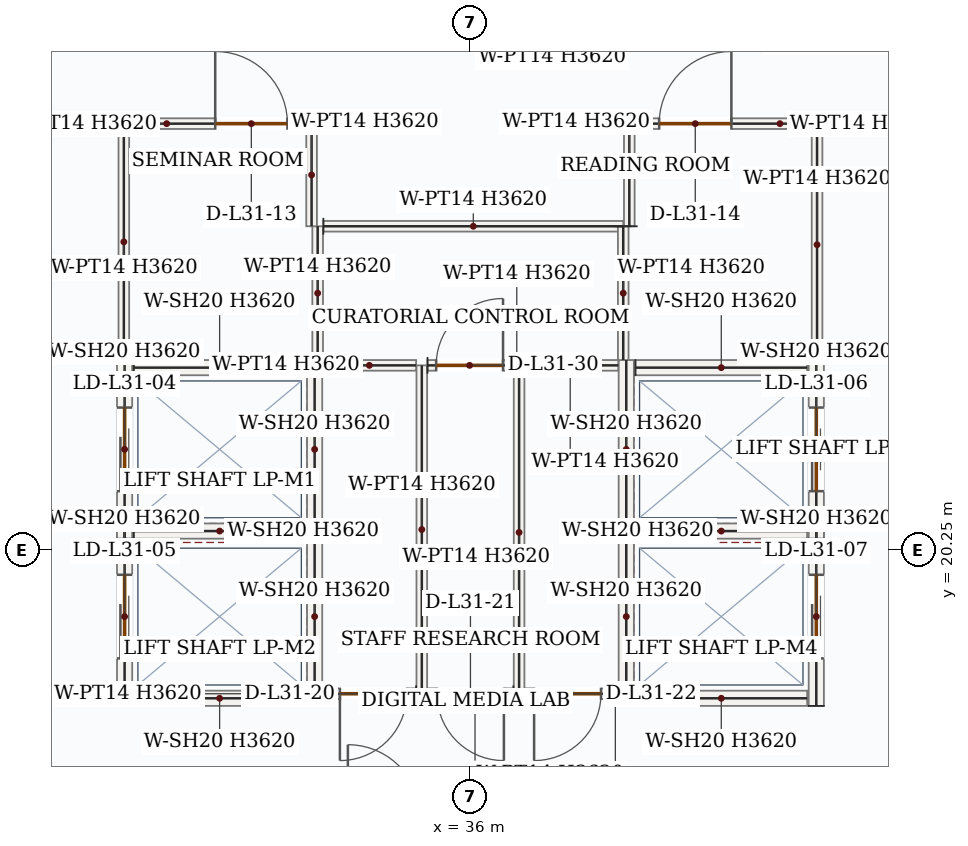
"""IFC4 building model, lengths in metres.
Left out: names, types, materials, properties, quantities, classifications, styles, units other than length and angle.
Written with IfcOpenShell. Run it as: python <this file> out.ifc"""

import sys

from ifc_helpers import new_model, si_unit, direction, frame, frame_2d, origin, place, context, subcontext, project, spatial, rectangle, extrude, source, transform, mapped, element, fill, save


model = new_model("IFC4")
c1 = context("Model", 3, precision=1e-05, world=origin(), true_north=direction((0.0, 1.0)))
c2 = subcontext(c1, "Body", "Model", "MODEL_VIEW")
j1 = project(units=[si_unit("LENGTHUNIT", "METRE"), si_unit("PLANEANGLEUNIT", "RADIAN")], contexts=[c1])
p1 = place(None, origin())
s1 = spatial("IfcSite", under=j1, at=p1, CompositionType="ELEMENT")
p2 = place(p1, origin())
s2 = spatial("IfcBuilding", under=s1, at=p2, CompositionType="ELEMENT")
p3 = place(p2, frame((0.0, 0.0, 139.5)))
s3 = spatial("IfcBuildingStorey", under=s2, at=p3, CompositionType="ELEMENT", Elevation=139.5)
p4 = place(p3, frame((31.45, 20.4, 0.0), z_axis=(0.0, 0.0, 1.0), x_axis=(0.0, 1.0, 0.0)))
e1 = element("IfcWall", 1, at=p4, inside=s3, PredefinedType="SOLIDWALL", context=c2, shape_type="SweptSolid", body=[
    extrude(rectangle(XDim=2.35, YDim=0.2, at=frame_2d((1.175, 0.0))), origin(), (0.0, 0.0, 1.0), 3.62),
])
p5 = place(p4, frame((0.625, 0.0, 0.0)))
e2 = element("IfcOpeningElement", 2, at=p5, cuts=e1, PredefinedType="OPENING", context=c2, shape_type="SweptSolid", body=[
    extrude(rectangle(XDim=1.1, YDim=2.15, at=frame_2d((0.55, 1.075))), frame((0.0, 0.11, 0.0), z_axis=(0.0, -1.0, 0.0), x_axis=(1.0, 0.0, 0.0)), (0.0, 0.0, 1.0), 0.22),
])
m1 = source(origin(), c2, "Body", "SweptSolid", [
    extrude(rectangle(XDim=2.35, YDim=0.2, at=frame_2d((1.175, 0.0))), origin(), (0.0, 0.0, 1.0), 3.62),
])
p6 = place(p3, frame((33.95, 20.4, 0.0), z_axis=(0.0, 0.0, 1.0), x_axis=(0.0, 1.0, 0.0)))
e3 = element("IfcWall", 3, at=p6, inside=s3, PredefinedType="SOLIDWALL", context=c2, shape_type="MappedRepresentation", body=[
    mapped(m1, transform((0.0, 0.0, 0.0), x_axis=(1.0, 0.0, 0.0), y_axis=(0.0, 1.0, 0.0), z_axis=(0.0, 0.0, 1.0), scale=1.0)),
])
m2 = source(origin(), c2, "Body", "SweptSolid", [
    extrude(rectangle(XDim=2.26, YDim=0.2, at=frame_2d((1.13, 0.0))), origin(), (0.0, 0.0, 1.0), 3.62),
])
for number, where, z_axis, x_axis in (
    (4, (31.57, 20.5, 0.0), (0.0, 0.0, 1.0), (1.0, 0.0, 0.0)),
    (5, (31.57, 22.65, 0.0), (0.0, 0.0, 1.0), (1.0, 0.0, 0.0)),
):
    element("IfcWall", number, at=place(p3, frame(where, z_axis=z_axis, x_axis=x_axis)), inside=s3, PredefinedType="SOLIDWALL", context=c2, shape_type="MappedRepresentation", body=[
        mapped(m2, transform((0.0, 0.0, 0.0), x_axis=(1.0, 0.0, 0.0), y_axis=(0.0, 1.0, 0.0), z_axis=(0.0, 0.0, 1.0), scale=1.0)),
    ])
p7 = place(p3, frame((31.45, 18.2, 0.0), z_axis=(0.0, 0.0, 1.0), x_axis=(0.0, 1.0, 0.0)))
e6 = element("IfcWall", 6, at=p7, inside=s3, PredefinedType="SOLIDWALL", context=c2, shape_type="SweptSolid", body=[
    extrude(rectangle(XDim=2.35, YDim=0.2, at=frame_2d((1.175, 0.0))), origin(), (0.0, 0.0, 1.0), 3.62),
])
p8 = place(p7, frame((0.625, 0.0, 0.0)))
e7 = element("IfcOpeningElement", 7, at=p8, cuts=e6, PredefinedType="OPENING", context=c2, shape_type="SweptSolid", body=[
    extrude(rectangle(XDim=1.1, YDim=2.15, at=frame_2d((0.55, 1.075))), frame((0.0, 0.11, 0.0), z_axis=(0.0, -1.0, 0.0), x_axis=(1.0, 0.0, 0.0)), (0.0, 0.0, 1.0), 0.22),
])
p9 = place(p3, frame((33.95, 18.2, 0.0), z_axis=(0.0, 0.0, 1.0), x_axis=(0.0, 1.0, 0.0)))
e8 = element("IfcWall", 8, at=p9, inside=s3, PredefinedType="SOLIDWALL", context=c2, shape_type="MappedRepresentation", body=[
    mapped(m1, transform((0.0, 0.0, 0.0), x_axis=(1.0, 0.0, 0.0), y_axis=(0.0, 1.0, 0.0), z_axis=(0.0, 0.0, 1.0), scale=1.0)),
])
p10 = place(p3, frame((31.57, 18.3, 0.0), z_axis=(0.0, 0.0, 1.0), x_axis=(1.0, 0.0, 0.0)))
e9 = element("IfcWall", 9, at=p10, inside=s3, PredefinedType="SOLIDWALL", context=c2, shape_type="MappedRepresentation", body=[
    mapped(m2, transform((0.0, 0.0, 0.0), x_axis=(1.0, 0.0, 0.0), y_axis=(0.0, 1.0, 0.0), z_axis=(0.0, 0.0, 1.0), scale=1.0)),
])
p11 = place(p3, frame((38.05, 20.4, 0.0), z_axis=(0.0, 0.0, 1.0), x_axis=(0.0, 1.0, 0.0)))
e10 = element("IfcWall", 10, at=p11, inside=s3, PredefinedType="SOLIDWALL", context=c2, shape_type="MappedRepresentation", body=[
    mapped(m1, transform((0.0, 0.0, 0.0), x_axis=(1.0, 0.0, 0.0), y_axis=(0.0, 1.0, 0.0), z_axis=(0.0, 0.0, 1.0), scale=1.0)),
])
p12 = place(p3, frame((40.55, 20.4, 0.0), z_axis=(0.0, 0.0, 1.0), x_axis=(0.0, 1.0, 0.0)))
e11 = element("IfcWall", 11, at=p12, inside=s3, PredefinedType="SOLIDWALL", context=c2, shape_type="SweptSolid", body=[
    extrude(rectangle(XDim=2.35, YDim=0.2, at=frame_2d((1.175, 0.0))), origin(), (0.0, 0.0, 1.0), 3.62),
])
p13 = place(p12, frame((0.625, 0.0, 0.0)))
e12 = element("IfcOpeningElement", 12, at=p13, cuts=e11, PredefinedType="OPENING", context=c2, shape_type="SweptSolid", body=[
    extrude(rectangle(XDim=1.1, YDim=2.15, at=frame_2d((0.55, 1.075))), frame((0.0, 0.11, 0.0), z_axis=(0.0, -1.0, 0.0), x_axis=(1.0, 0.0, 0.0)), (0.0, 0.0, 1.0), 0.22),
])
for number, where, z_axis, x_axis in (
    (13, (38.17, 20.5, 0.0), (0.0, 0.0, 1.0), (1.0, 0.0, 0.0)),
    (14, (38.17, 22.65, 0.0), (0.0, 0.0, 1.0), (1.0, 0.0, 0.0)),
):
    element("IfcWall", number, at=place(p3, frame(where, z_axis=z_axis, x_axis=x_axis)), inside=s3, PredefinedType="SOLIDWALL", context=c2, shape_type="MappedRepresentation", body=[
        mapped(m2, transform((0.0, 0.0, 0.0), x_axis=(1.0, 0.0, 0.0), y_axis=(0.0, 1.0, 0.0), z_axis=(0.0, 0.0, 1.0), scale=1.0)),
    ])
p14 = place(p3, frame((38.05, 18.2, 0.0), z_axis=(0.0, 0.0, 1.0), x_axis=(0.0, 1.0, 0.0)))
e15 = element("IfcWall", 15, at=p14, inside=s3, PredefinedType="SOLIDWALL", context=c2, shape_type="MappedRepresentation", body=[
    mapped(m1, transform((0.0, 0.0, 0.0), x_axis=(1.0, 0.0, 0.0), y_axis=(0.0, 1.0, 0.0), z_axis=(0.0, 0.0, 1.0), scale=1.0)),
])
p15 = place(p3, frame((40.55, 18.2, 0.0), z_axis=(0.0, 0.0, 1.0), x_axis=(0.0, 1.0, 0.0)))
e16 = element("IfcWall", 16, at=p15, inside=s3, PredefinedType="SOLIDWALL", context=c2, shape_type="SweptSolid", body=[
    extrude(rectangle(XDim=2.35, YDim=0.2, at=frame_2d((1.175, 0.0))), origin(), (0.0, 0.0, 1.0), 3.62),
])
p16 = place(p15, frame((0.625, 0.0, 0.0)))
e17 = element("IfcOpeningElement", 17, at=p16, cuts=e16, PredefinedType="OPENING", context=c2, shape_type="SweptSolid", body=[
    extrude(rectangle(XDim=1.1, YDim=2.15, at=frame_2d((0.55, 1.075))), frame((0.0, 0.11, 0.0), z_axis=(0.0, -1.0, 0.0), x_axis=(1.0, 0.0, 0.0)), (0.0, 0.0, 1.0), 0.22),
])
p17 = place(p3, frame((38.17, 18.3, 0.0), z_axis=(0.0, 0.0, 1.0), x_axis=(1.0, 0.0, 0.0)))
e18 = element("IfcWall", 18, at=p17, inside=s3, PredefinedType="SOLIDWALL", context=c2, shape_type="MappedRepresentation", body=[
    mapped(m2, transform((0.0, 0.0, 0.0), x_axis=(1.0, 0.0, 0.0), y_axis=(0.0, 1.0, 0.0), z_axis=(0.0, 0.0, 1.0), scale=1.0)),
])
m3 = source(origin(), c2, "Body", "SweptSolid", [
    extrude(rectangle(XDim=4.32, YDim=0.14, at=frame_2d((2.16, 0.0))), origin(), (0.0, 0.0, 1.0), 3.62),
])
p18 = place(p3, frame((35.36, 18.36, 0.0), z_axis=(0.0, 0.0, 1.0), x_axis=(0.0, 1.0, 0.0)))
e19 = element("IfcWall", 19, at=p18, inside=s3, PredefinedType="PARTITIONING", context=c2, shape_type="MappedRepresentation", body=[
    mapped(m3, transform((0.0, 0.0, 0.0), x_axis=(1.0, 0.0, 0.0), y_axis=(0.0, 1.0, 0.0), z_axis=(0.0, 0.0, 1.0), scale=1.0)),
])
p19 = place(p3, frame((35.435, 22.68, 0.0), z_axis=(0.0, 0.0, 1.0), x_axis=(1.0, 0.0, 0.0)))
e20 = element("IfcWall", 20, at=p19, inside=s3, PredefinedType="PARTITIONING", context=c2, shape_type="SweptSolid", body=[
    extrude(rectangle(XDim=1.205, YDim=0.14, at=frame_2d((0.603, 0.0))), origin(), (0.0, 0.0, 1.0), 3.62),
])
p20 = place(p19, frame((0.114, 0.0, 0.0)))
e21 = element("IfcOpeningElement", 21, at=p20, cuts=e20, PredefinedType="OPENING", context=c2, shape_type="SweptSolid", body=[
    extrude(rectangle(XDim=0.88, YDim=2.1, at=frame_2d((0.44, 1.05))), frame((0.0, 0.08, 0.0), z_axis=(0.0, -1.0, 0.0), x_axis=(1.0, 0.0, 0.0)), (0.0, 0.0, 1.0), 0.16),
])
m4 = source(origin(), c2, "Body", "SweptSolid", [
    extrude(rectangle(XDim=4.245, YDim=0.14, at=frame_2d((2.123, 0.0))), origin(), (0.0, 0.0, 1.0), 3.62),
])
p21 = place(p3, frame((36.64, 22.605, 0.0), z_axis=(0.0, 0.0, 1.0), x_axis=(0.0, -1.0, 0.0)))
e22 = element("IfcWall", 22, at=p21, inside=s3, PredefinedType="PARTITIONING", context=c2, shape_type="MappedRepresentation", body=[
    mapped(m4, transform((0.0, 0.0, 0.0), x_axis=(1.0, 0.0, 0.0), y_axis=(0.0, 1.0, 0.0), z_axis=(0.0, 0.0, 1.0), scale=1.0)),
])
p22 = place(p3, frame((36.565, 18.36, 0.0), z_axis=(0.0, 0.0, 1.0), x_axis=(-1.0, 0.0, 0.0)))
e23 = element("IfcWall", 23, at=p22, inside=s3, PredefinedType="PARTITIONING", context=c2, shape_type="SweptSolid", body=[
    extrude(rectangle(XDim=1.13, YDim=0.14, at=frame_2d((0.565, 0.0))), origin(), (0.0, 0.0, 1.0), 3.62),
])
p23 = place(p22, frame((0.125, 0.0, 0.0)))
e24 = element("IfcOpeningElement", 24, at=p23, cuts=e23, PredefinedType="OPENING", context=c2, shape_type="SweptSolid", body=[
    extrude(rectangle(XDim=0.88, YDim=2.1, at=frame_2d((0.44, 1.05))), frame((0.0, 0.08, 0.0), z_axis=(0.0, -1.0, 0.0), x_axis=(1.0, 0.0, 0.0)), (0.0, 0.0, 1.0), 0.16),
])
m5 = source(origin(), c2, "Body", "SweptSolid", [
    extrude(rectangle(XDim=1.23, YDim=0.14, at=frame_2d((0.615, 0.0))), origin(), (0.0, 0.0, 1.0), 3.62),
])
p24 = place(p3, frame((34.055, 22.68, 0.0), z_axis=(0.0, 0.0, 1.0), x_axis=(1.0, 0.0, 0.0)))
e25 = element("IfcWall", 25, at=p24, inside=s3, PredefinedType="PARTITIONING", context=c2, shape_type="MappedRepresentation", body=[
    mapped(m5, transform((0.0, 0.0, 0.0), x_axis=(1.0, 0.0, 0.0), y_axis=(0.0, 1.0, 0.0), z_axis=(0.0, 0.0, 1.0), scale=1.0)),
])
p25 = place(p3, frame((35.285, 18.36, 0.0), z_axis=(0.0, 0.0, 1.0), x_axis=(-1.0, 0.0, 0.0)))
e26 = element("IfcWall", 26, at=p25, inside=s3, PredefinedType="PARTITIONING", context=c2, shape_type="SweptSolid", body=[
    extrude(rectangle(XDim=1.23, YDim=0.14, at=frame_2d((0.615, 0.0))), origin(), (0.0, 0.0, 1.0), 3.62),
])
p26 = place(p25, frame((0.123, 0.0, 0.0)))
e27 = element("IfcOpeningElement", 27, at=p26, cuts=e26, PredefinedType="OPENING", context=c2, shape_type="SweptSolid", body=[
    extrude(rectangle(XDim=0.88, YDim=2.1, at=frame_2d((0.44, 1.05))), frame((0.0, 0.08, 0.0), z_axis=(0.0, -1.0, 0.0), x_axis=(1.0, 0.0, 0.0)), (0.0, 0.0, 1.0), 0.16),
])
m6 = source(origin(), c2, "Body", "SweptSolid", [
    extrude(rectangle(XDim=1.265, YDim=0.14, at=frame_2d((0.633, 0.0))), origin(), (0.0, 0.0, 1.0), 3.62),
])
p27 = place(p3, frame((36.68, 22.68, 0.0), z_axis=(0.0, 0.0, 1.0), x_axis=(1.0, 0.0, 0.0)))
e28 = element("IfcWall", 28, at=p27, inside=s3, PredefinedType="PARTITIONING", context=c2, shape_type="MappedRepresentation", body=[
    mapped(m6, transform((0.0, 0.0, 0.0), x_axis=(1.0, 0.0, 0.0), y_axis=(0.0, 1.0, 0.0), z_axis=(0.0, 0.0, 1.0), scale=1.0)),
])
p28 = place(p3, frame((37.945, 18.36, 0.0), z_axis=(0.0, 0.0, 1.0), x_axis=(-1.0, 0.0, 0.0)))
e29 = element("IfcWall", 29, at=p28, inside=s3, PredefinedType="PARTITIONING", context=c2, shape_type="SweptSolid", body=[
    extrude(rectangle(XDim=1.23, YDim=0.14, at=frame_2d((0.615, 0.0))), origin(), (0.0, 0.0, 1.0), 3.62),
])
p29 = place(p28, frame((0.228, 0.0, 0.0)))
e30 = element("IfcOpeningElement", 30, at=p29, cuts=e29, PredefinedType="OPENING", context=c2, shape_type="SweptSolid", body=[
    extrude(rectangle(XDim=0.88, YDim=2.1, at=frame_2d((0.44, 1.05))), frame((0.0, 0.08, 0.0), z_axis=(0.0, -1.0, 0.0), x_axis=(1.0, 0.0, 0.0)), (0.0, 0.0, 1.0), 0.16),
])
m7 = source(origin(), c2, "Body", "SweptSolid", [
    extrude(rectangle(XDim=1.76, YDim=0.14, at=frame_2d((0.88, 0.0))), origin(), (0.0, 0.0, 1.0), 3.62),
])
p30 = place(p3, frame((33.99, 22.75, 0.0), z_axis=(0.0, 0.0, 1.0), x_axis=(0.0, 1.0, 0.0)))
e31 = element("IfcWall", 31, at=p30, inside=s3, PredefinedType="PARTITIONING", context=c2, shape_type="MappedRepresentation", body=[
    mapped(m7, transform((0.0, 0.0, 0.0), x_axis=(1.0, 0.0, 0.0), y_axis=(0.0, 1.0, 0.0), z_axis=(0.0, 0.0, 1.0), scale=1.0)),
])
m8 = source(origin(), c2, "Body", "SweptSolid", [
    extrude(rectangle(XDim=3.945, YDim=0.14, at=frame_2d((1.973, 0.0))), origin(), (0.0, 0.0, 1.0), 3.62),
])
p31 = place(p3, frame((34.065, 24.51, 0.0), z_axis=(0.0, 0.0, 1.0), x_axis=(1.0, 0.0, 0.0)))
e32 = element("IfcWall", 32, at=p31, inside=s3, PredefinedType="PARTITIONING", context=c2, shape_type="MappedRepresentation", body=[
    mapped(m8, transform((0.0, 0.0, 0.0), x_axis=(1.0, 0.0, 0.0), y_axis=(0.0, 1.0, 0.0), z_axis=(0.0, 0.0, 1.0), scale=1.0)),
])
p32 = place(p3, frame((38.01, 24.51, 0.0), z_axis=(0.0, 0.0, 1.0), x_axis=(0.0, -1.0, 0.0)))
e33 = element("IfcWall", 33, at=p32, inside=s3, PredefinedType="PARTITIONING", context=c2, shape_type="MappedRepresentation", body=[
    mapped(m7, transform((0.0, 0.0, 0.0), x_axis=(1.0, 0.0, 0.0), y_axis=(0.0, 1.0, 0.0), z_axis=(0.0, 0.0, 1.0), scale=1.0)),
])
m9 = source(origin(), c2, "Body", "SweptSolid", [
    extrude(rectangle(XDim=3.11, YDim=0.14, at=frame_2d((1.555, 0.0))), origin(), (0.0, 0.0, 1.0), 3.62),
])
p33 = place(p3, frame((31.44, 22.75, 0.0), z_axis=(0.0, 0.0, 1.0), x_axis=(0.0, 1.0, 0.0)))
e34 = element("IfcWall", 34, at=p33, inside=s3, PredefinedType="PARTITIONING", context=c2, shape_type="MappedRepresentation", body=[
    mapped(m9, transform((0.0, 0.0, 0.0), x_axis=(1.0, 0.0, 0.0), y_axis=(0.0, 1.0, 0.0), z_axis=(0.0, 0.0, 1.0), scale=1.0)),
])
p34 = place(p3, frame((31.515, 25.86, 0.0), z_axis=(0.0, 0.0, 1.0), x_axis=(1.0, 0.0, 0.0)))
e35 = element("IfcWall", 35, at=p34, inside=s3, PredefinedType="PARTITIONING", context=c2, shape_type="SweptSolid", body=[
    extrude(rectangle(XDim=2.395, YDim=0.14, at=frame_2d((1.198, 0.0))), origin(), (0.0, 0.0, 1.0), 3.62),
])
p35 = place(p34, frame((1.127, 0.0, 0.0)))
e36 = element("IfcOpeningElement", 36, at=p35, cuts=e35, PredefinedType="OPENING", context=c2, shape_type="SweptSolid", body=[
    extrude(rectangle(XDim=0.95, YDim=2.15, at=frame_2d((0.475, 1.075))), frame((0.0, 0.08, 0.0), z_axis=(0.0, -1.0, 0.0), x_axis=(1.0, 0.0, 0.0)), (0.0, 0.0, 1.0), 0.16),
])
m10 = source(origin(), c2, "Body", "SweptSolid", [
    extrude(rectangle(XDim=1.35, YDim=0.14, at=frame_2d((0.675, 0.0))), origin(), (0.0, 0.0, 1.0), 3.62),
])
for number, where, z_axis, x_axis in (
    (37, (33.91, 25.86, 0.0), (0.0, 0.0, 1.0), (0.0, -1.0, 0.0)),
    (38, (38.09, 24.51, 0.0), (0.0, 0.0, 1.0), (0.0, 1.0, 0.0)),
):
    element("IfcWall", number, at=place(p3, frame(where, z_axis=z_axis, x_axis=x_axis)), inside=s3, PredefinedType="PARTITIONING", context=c2, shape_type="MappedRepresentation", body=[
        mapped(m10, transform((0.0, 0.0, 0.0), x_axis=(1.0, 0.0, 0.0), y_axis=(0.0, 1.0, 0.0), z_axis=(0.0, 0.0, 1.0), scale=1.0)),
    ])
p36 = place(p3, frame((38.165, 25.86, 0.0), z_axis=(0.0, 0.0, 1.0), x_axis=(1.0, 0.0, 0.0)))
e39 = element("IfcWall", 39, at=p36, inside=s3, PredefinedType="PARTITIONING", context=c2, shape_type="SweptSolid", body=[
    extrude(rectangle(XDim=2.395, YDim=0.14, at=frame_2d((1.198, 0.0))), origin(), (0.0, 0.0, 1.0), 3.62),
])
p37 = place(p36, frame((0.318, 0.0, 0.0)))
e40 = element("IfcOpeningElement", 40, at=p37, cuts=e39, PredefinedType="OPENING", context=c2, shape_type="SweptSolid", body=[
    extrude(rectangle(XDim=0.95, YDim=2.15, at=frame_2d((0.475, 1.075))), frame((0.0, 0.08, 0.0), z_axis=(0.0, -1.0, 0.0), x_axis=(1.0, 0.0, 0.0)), (0.0, 0.0, 1.0), 0.16),
])
m11 = source(origin(), c2, "Body", "SweptSolid", [
    extrude(rectangle(XDim=3.035, YDim=0.14, at=frame_2d((1.518, 0.0))), origin(), (0.0, 0.0, 1.0), 3.62),
])
p38 = place(p3, frame((40.56, 25.785, 0.0), z_axis=(0.0, 0.0, 1.0), x_axis=(0.0, -1.0, 0.0)))
e41 = element("IfcWall", 41, at=p38, inside=s3, PredefinedType="PARTITIONING", context=c2, shape_type="MappedRepresentation", body=[
    mapped(m11, transform((0.0, 0.0, 0.0), x_axis=(1.0, 0.0, 0.0), y_axis=(0.0, 1.0, 0.0), z_axis=(0.0, 0.0, 1.0), scale=1.0)),
])
m12 = source(origin(), c2, "Body", "SweptSolid", [
    extrude(rectangle(XDim=1.1, YDim=2.15, at=frame_2d((0.55, 1.075))), frame((0.0, 0.025, 0.0), z_axis=(0.0, -1.0, 0.0), x_axis=(1.0, 0.0, 0.0)), (0.0, 0.0, 1.0), 0.05),
])
p39 = place(p5, origin())
e42 = element("IfcDoor", 42, at=p39, inside=s3, OperationType="DOUBLE_DOOR_SLIDING", PredefinedType="DOOR", context=c2, shape_type="MappedRepresentation", body=[
    mapped(m12, transform((0.0, 0.0, 0.0), x_axis=(1.0, 0.0, 0.0), y_axis=(0.0, 1.0, 0.0), z_axis=(0.0, 0.0, 1.0), scale=1.0)),
])
fill(e2, e42)
p40 = place(p8, origin())
e43 = element("IfcDoor", 43, at=p40, inside=s3, OperationType="DOUBLE_DOOR_SLIDING", PredefinedType="DOOR", context=c2, shape_type="MappedRepresentation", body=[
    mapped(m12, transform((0.0, 0.0, 0.0), x_axis=(1.0, 0.0, 0.0), y_axis=(0.0, 1.0, 0.0), z_axis=(0.0, 0.0, 1.0), scale=1.0)),
])
fill(e7, e43)
p41 = place(p13, origin())
e44 = element("IfcDoor", 44, at=p41, inside=s3, OperationType="DOUBLE_DOOR_SLIDING", PredefinedType="DOOR", context=c2, shape_type="MappedRepresentation", body=[
    mapped(m12, transform((0.0, 0.0, 0.0), x_axis=(1.0, 0.0, 0.0), y_axis=(0.0, 1.0, 0.0), z_axis=(0.0, 0.0, 1.0), scale=1.0)),
])
fill(e12, e44)
p42 = place(p16, origin())
e45 = element("IfcDoor", 45, at=p42, inside=s3, OperationType="DOUBLE_DOOR_SLIDING", PredefinedType="DOOR", context=c2, shape_type="MappedRepresentation", body=[
    mapped(m12, transform((0.0, 0.0, 0.0), x_axis=(1.0, 0.0, 0.0), y_axis=(0.0, 1.0, 0.0), z_axis=(0.0, 0.0, 1.0), scale=1.0)),
])
fill(e17, e45)
m13 = source(origin(), c2, "Body", "SweptSolid", [
    extrude(rectangle(XDim=0.95, YDim=2.15, at=frame_2d((0.475, 1.075))), frame((0.0, 0.025, 0.0), z_axis=(0.0, -1.0, 0.0), x_axis=(1.0, 0.0, 0.0)), (0.0, 0.0, 1.0), 0.05),
])
p43 = place(p35, origin())
e46 = element("IfcDoor", 46, at=p43, inside=s3, OperationType="SINGLE_SWING_LEFT", PredefinedType="DOOR", context=c2, shape_type="MappedRepresentation", body=[
    mapped(m13, transform((0.0, 0.0, 0.0), x_axis=(1.0, 0.0, 0.0), y_axis=(0.0, 1.0, 0.0), z_axis=(0.0, 0.0, 1.0), scale=1.0)),
])
fill(e36, e46)
p44 = place(p37, origin())
e47 = element("IfcDoor", 47, at=p44, inside=s3, OperationType="SINGLE_SWING_RIGHT", PredefinedType="DOOR", context=c2, shape_type="MappedRepresentation", body=[
    mapped(m13, transform((0.0, 0.0, 0.0), x_axis=(1.0, 0.0, 0.0), y_axis=(0.0, 1.0, 0.0), z_axis=(0.0, 0.0, 1.0), scale=1.0)),
])
fill(e40, e47)
m14 = source(origin(), c2, "Body", "SweptSolid", [
    extrude(rectangle(XDim=0.88, YDim=2.1, at=frame_2d((0.44, 1.05))), frame((0.0, 0.025, 0.0), z_axis=(0.0, -1.0, 0.0), x_axis=(1.0, 0.0, 0.0)), (0.0, 0.0, 1.0), 0.05),
])
p45 = place(p26, origin())
e48 = element("IfcDoor", 48, at=p45, inside=s3, OperationType="SINGLE_SWING_RIGHT", PredefinedType="DOOR", context=c2, shape_type="MappedRepresentation", body=[
    mapped(m14, transform((0.0, 0.0, 0.0), x_axis=(1.0, 0.0, 0.0), y_axis=(0.0, 1.0, 0.0), z_axis=(0.0, 0.0, 1.0), scale=1.0)),
])
fill(e27, e48)
p46 = place(p23, origin())
e49 = element("IfcDoor", 49, at=p46, inside=s3, OperationType="SINGLE_SWING_LEFT", PredefinedType="DOOR", context=c2, shape_type="MappedRepresentation", body=[
    mapped(m14, transform((0.0, 0.0, 0.0), x_axis=(1.0, 0.0, 0.0), y_axis=(0.0, 1.0, 0.0), z_axis=(0.0, 0.0, 1.0), scale=1.0)),
])
fill(e24, e49)
p47 = place(p29, origin())
e50 = element("IfcDoor", 50, at=p47, inside=s3, OperationType="SINGLE_SWING_RIGHT", PredefinedType="DOOR", context=c2, shape_type="MappedRepresentation", body=[
    mapped(m14, transform((0.0, 0.0, 0.0), x_axis=(1.0, 0.0, 0.0), y_axis=(0.0, 1.0, 0.0), z_axis=(0.0, 0.0, 1.0), scale=1.0)),
])
fill(e30, e50)
p48 = place(p20, origin())
e51 = element("IfcDoor", 51, at=p48, inside=s3, OperationType="SINGLE_SWING_RIGHT", PredefinedType="DOOR", context=c2, shape_type="MappedRepresentation", body=[
    mapped(m14, transform((0.0, 0.0, 0.0), x_axis=(1.0, 0.0, 0.0), y_axis=(0.0, 1.0, 0.0), z_axis=(0.0, 0.0, 1.0), scale=1.0)),
])
fill(e21, e51)
save(model, sys.argv[1])
